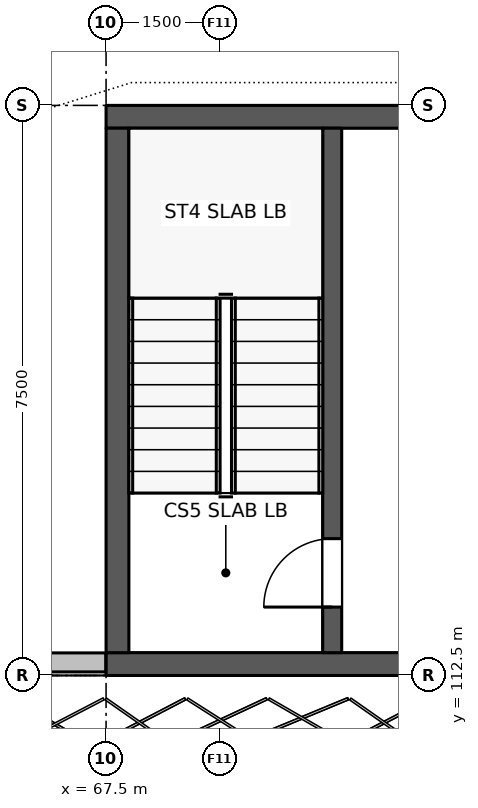
"""IFC4 building model, lengths in metres.
Left out: names, types, materials, properties, quantities, classifications, styles, units other than length and angle.
Written with IfcOpenShell. Run it as: python <this file> out.ifc"""

import sys

from ifc_helpers import new_model, si_unit, direction, frame, frame_2d, origin, place, context, subcontext, project, spatial, rectangle, extrude, element, fill, save


model = new_model("IFC4")
c1 = context("Model", 3, precision=1e-05, world=origin(), true_north=direction((0.0, 1.0)))
c2 = subcontext(c1, "Body", "Model", "MODEL_VIEW")
j1 = project(units=[si_unit("LENGTHUNIT", "METRE"), si_unit("PLANEANGLEUNIT", "RADIAN")], contexts=[c1])
p1 = place(None, origin())
s1 = spatial("IfcSite", under=j1, at=p1, CompositionType="ELEMENT")
p2 = place(p1, origin())
s2 = spatial("IfcBuilding", under=s1, at=p2, CompositionType="ELEMENT")
p3 = place(p2, frame((0.0, 0.0, 6.6)))
s3 = spatial("IfcBuildingStorey", under=s2, at=p3, CompositionType="ELEMENT", Elevation=6.6)
p4 = place(p3, frame((60.186, 112.672, 0.0), z_axis=(0.0, 0.0, 1.0), x_axis=(1.0, 0.0, 0.0)))
e1 = element("IfcWall", 1, at=p4, inside=s3, PredefinedType="SOLIDWALL", context=c2, shape_type="SweptSolid", body=[
    extrude(rectangle(XDim=7.31, YDim=0.25, at=frame_2d((3.655, 0.0))), origin(), (0.0, 0.0, 1.0), 1.1),
])
p5 = place(p3, frame((67.5, 119.85, 0.0), z_axis=(0.0, 0.0, 1.0), x_axis=(1.0, 0.0, 0.0)))
e2 = element("IfcWall", 2, at=p5, inside=s3, PredefinedType="SHEAR", context=c2, shape_type="SweptSolid", body=[
    extrude(rectangle(XDim=15.0, YDim=0.3, at=frame_2d((7.5, 0.0))), origin(), (0.0, 0.0, 1.0), 3.3),
])
p6 = place(p5, frame((6.6, 0.0, 0.0)))
e3 = element("IfcOpeningElement", 3, at=p6, cuts=e2, PredefinedType="OPENING", context=c2, shape_type="SweptSolid", body=[
    extrude(rectangle(XDim=1.8, YDim=2.1, at=frame_2d((0.9, 1.05))), frame((0.0, 0.16, 0.0), z_axis=(0.0, -1.0, 0.0), x_axis=(1.0, 0.0, 0.0)), (0.0, 0.0, 1.0), 0.32),
])
p7 = place(p3, frame((72.5, 112.65, 0.0), z_axis=(0.0, 0.0, 1.0), x_axis=(-1.0, 0.0, 0.0)))
e4 = element("IfcWall", 4, at=p7, inside=s3, PredefinedType="SHEAR", context=c2, shape_type="SweptSolid", body=[
    extrude(rectangle(XDim=5.0, YDim=0.3, at=frame_2d((2.5, 0.0))), origin(), (0.0, 0.0, 1.0), 3.3),
])
p8 = place(p3, frame((67.65, 119.7, 0.0), z_axis=(0.0, 0.0, 1.0), x_axis=(0.0, -1.0, 0.0)))
e5 = element("IfcWall", 5, at=p8, inside=s3, PredefinedType="SHEAR", context=c2, shape_type="SweptSolid", body=[
    extrude(rectangle(XDim=6.9, YDim=0.3, at=frame_2d((3.45, 0.0))), origin(), (0.0, 0.0, 1.0), 3.3),
])
p9 = place(p3, frame((70.475, 112.8, 0.0), z_axis=(0.0, 0.0, 1.0), x_axis=(0.0, 1.0, 0.0)))
e6 = element("IfcWall", 6, at=p9, inside=s3, PredefinedType="STANDARD", context=c2, shape_type="SweptSolid", body=[
    extrude(rectangle(XDim=6.9, YDim=0.25, at=frame_2d((3.45, 0.0))), origin(), (0.0, 0.0, 1.0), 3.1),
])
p10 = place(p9, frame((0.6, 0.0, 0.0)))
e7 = element("IfcOpeningElement", 7, at=p10, cuts=e6, PredefinedType="OPENING", context=c2, shape_type="SweptSolid", body=[
    extrude(rectangle(XDim=0.9, YDim=2.1, at=frame_2d((0.45, 1.05))), frame((0.0, 0.135, 0.0), z_axis=(0.0, -1.0, 0.0), x_axis=(1.0, 0.0, 0.0)), (0.0, 0.0, 1.0), 0.27),
])
p11 = place(p10, origin())
e8 = element("IfcDoor", 8, at=p11, inside=s3, OperationType="SINGLE_SWING_RIGHT", PredefinedType="DOOR", context=c2, shape_type="SweptSolid", body=[
    extrude(rectangle(XDim=0.9, YDim=2.1, at=frame_2d((0.45, 1.05))), frame((0.0, 0.025, 0.0), z_axis=(0.0, -1.0, 0.0), x_axis=(1.0, 0.0, 0.0)), (0.0, 0.0, 1.0), 0.05),
])
fill(e7, e8)
save(model, sys.argv[1])
